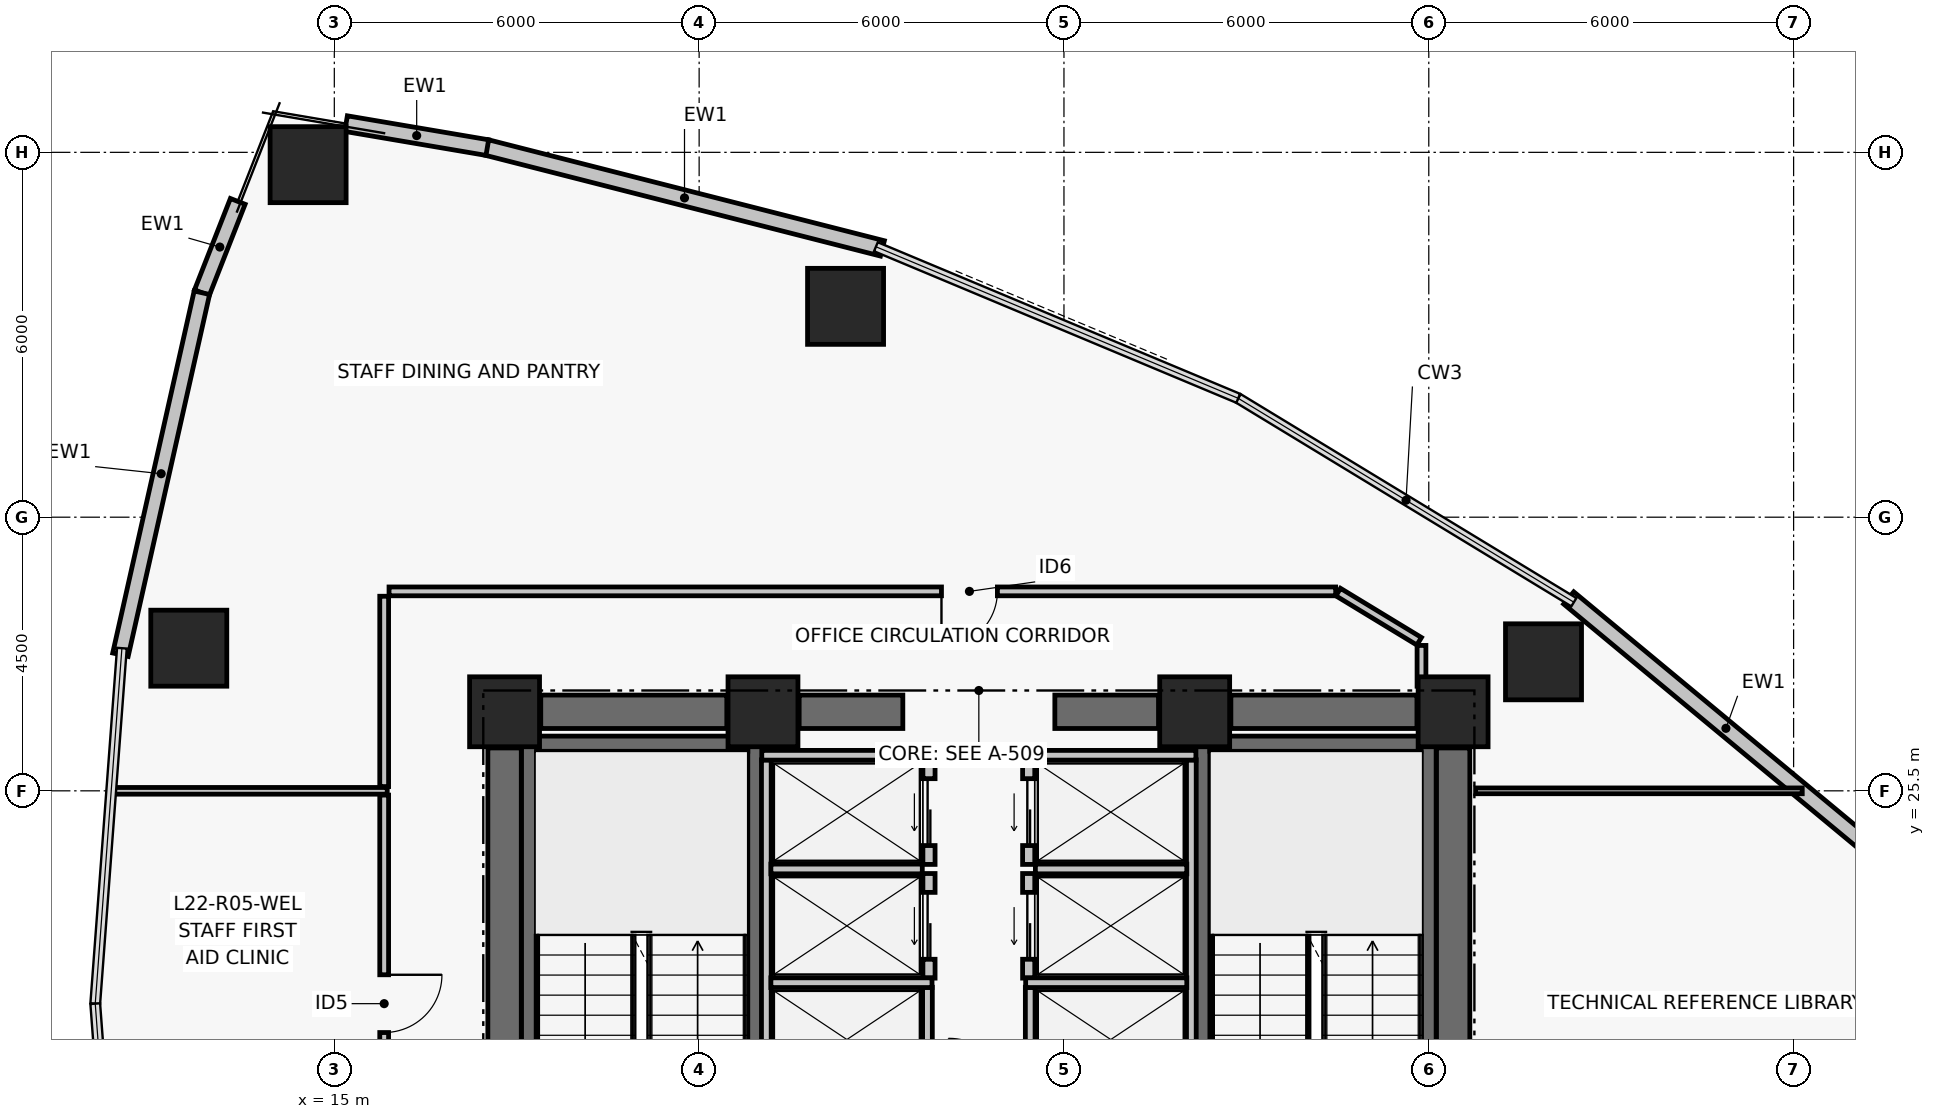
"""IFC4 building model, lengths in metres.
Left out: names, types, materials, properties, quantities, classifications, styles, units other than length and angle.
Written with IfcOpenShell. Run it as: python <this file> out.ifc"""

import sys

from ifc_helpers import new_model, si_unit, direction, frame, frame_2d, origin, origin_2d, place, context, subcontext, project, spatial, rectangle, hollow_rectangle, extrude, element, fill, save


model = new_model("IFC4")
c1 = context("Model", 3, precision=1e-05, world=origin(), true_north=direction((0.0, 1.0)))
c2 = subcontext(c1, "Body", "Model", "MODEL_VIEW")
j1 = project(units=[si_unit("LENGTHUNIT", "METRE"), si_unit("PLANEANGLEUNIT", "RADIAN")], contexts=[c1])
p1 = place(None, origin())
s1 = spatial("IfcSite", under=j1, at=p1, CompositionType="ELEMENT")
p2 = place(p1, origin())
s2 = spatial("IfcBuilding", under=s1, at=p2, CompositionType="ELEMENT")
p3 = place(p2, frame((0.0, 0.0, 92.82)))
s3 = spatial("IfcBuildingStorey", under=s2, at=p3, CompositionType="ELEMENT", Elevation=92.82)
for number, where, z_axis, x_axis in (
    (1, (17.8, 26.8, 0.0), (0.0, 0.0, 1.0), (1.0, 0.0, 0.0)),
    (2, (22.05, 26.8, 0.0), (0.0, 0.0, 1.0), (1.0, 0.0, 0.0)),
    (3, (29.15, 26.8, 0.0), (0.0, 0.0, 1.0), (1.0, 0.0, 0.0)),
    (4, (33.4, 26.8, 0.0), (0.0, 0.0, 1.0), (1.0, 0.0, 0.0)),
):
    element("IfcColumn", number, at=place(p3, frame(where, z_axis=z_axis, x_axis=x_axis)), inside=s3, PredefinedType="COLUMN", context=c2, shape_type="SweptSolid", body=[
        extrude(rectangle(XDim=1.15, YDim=1.15, at=origin_2d()), origin(), (0.0, 0.0, 1.0), 3.72),
    ])
p4 = place(p3, frame((18.395, 26.8, 0.0), z_axis=(0.0, 0.0, 1.0), x_axis=(1.0, 0.0, 0.0)))
e5 = element("IfcWall", 5, at=p4, inside=s3, PredefinedType="SHEAR", context=c2, shape_type="SweptSolid", body=[
    extrude(rectangle(XDim=3.06, YDim=0.55, at=frame_2d((1.53, 0.0))), origin(), (0.0, 0.0, 1.0), 3.47),
])
p5 = place(p3, frame((22.645, 26.8, 0.0), z_axis=(0.0, 0.0, 1.0), x_axis=(1.0, 0.0, 0.0)))
e6 = element("IfcWall", 6, at=p5, inside=s3, PredefinedType="SHEAR", context=c2, shape_type="SweptSolid", body=[
    extrude(rectangle(XDim=1.705, YDim=0.55, at=frame_2d((0.853, 0.0))), origin(), (0.0, 0.0, 1.0), 3.47),
])
p6 = place(p3, frame((26.85, 26.8, 0.0), z_axis=(0.0, 0.0, 1.0), x_axis=(1.0, 0.0, 0.0)))
e7 = element("IfcWall", 7, at=p6, inside=s3, PredefinedType="SHEAR", context=c2, shape_type="SweptSolid", body=[
    extrude(rectangle(XDim=1.705, YDim=0.55, at=frame_2d((0.853, 0.0))), origin(), (0.0, 0.0, 1.0), 3.47),
])
p7 = place(p3, frame((29.745, 26.8, 0.0), z_axis=(0.0, 0.0, 1.0), x_axis=(1.0, 0.0, 0.0)))
e8 = element("IfcWall", 8, at=p7, inside=s3, PredefinedType="SHEAR", context=c2, shape_type="SweptSolid", body=[
    extrude(rectangle(XDim=3.06, YDim=0.55, at=frame_2d((1.53, 0.0))), origin(), (0.0, 0.0, 1.0), 3.47),
])
for number, where, z_axis, x_axis in (
    (9, (17.8, 17.795, 0.0), (0.0, 0.0, 1.0), (0.0, 1.0, 0.0)),
    (10, (33.4, 17.795, 0.0), (0.0, 0.0, 1.0), (0.0, 1.0, 0.0)),
):
    element("IfcWall", number, at=place(p3, frame(where, z_axis=z_axis, x_axis=x_axis)), inside=s3, PredefinedType="SHEAR", context=c2, shape_type="SweptSolid", body=[
        extrude(rectangle(XDim=8.41, YDim=0.55, at=frame_2d((4.205, 0.0))), origin(), (0.0, 0.0, 1.0), 3.47),
    ])
p8 = place(p3, frame((18.204, 17.6, 0.0), z_axis=(0.0, 0.0, 1.0), x_axis=(0.0, 1.0, 0.0)))
e11 = element("IfcWall", 11, at=p8, inside=s3, PredefinedType="SHEAR", context=c2, shape_type="SweptSolid", body=[
    extrude(rectangle(XDim=8.8, YDim=0.25, at=frame_2d((4.4, 0.0))), origin(), (0.0, 0.0, 1.0), 3.47),
])
p9 = place(p3, frame((21.925, 17.6, 0.0), z_axis=(0.0, 0.0, 1.0), x_axis=(0.0, 1.0, 0.0)))
e12 = element("IfcWall", 12, at=p9, inside=s3, PredefinedType="SHEAR", context=c2, shape_type="SweptSolid", body=[
    extrude(rectangle(XDim=8.8, YDim=0.25, at=frame_2d((4.4, 0.0))), origin(), (0.0, 0.0, 1.0), 3.47),
])
p10 = place(p9, frame((0.35, 0.0, 0.0)))
e13 = element("IfcOpeningElement", 13, at=p10, cuts=e12, PredefinedType="OPENING", context=c2, shape_type="SweptSolid", body=[
    extrude(rectangle(XDim=1.05, YDim=2.08, at=frame_2d((0.525, 1.04))), frame((0.0, 0.135, 0.0), z_axis=(0.0, -1.0, 0.0), x_axis=(1.0, 0.0, 0.0)), (0.0, 0.0, 1.0), 0.27),
])
p11 = place(p3, frame((18.329, 26.275, 0.0), z_axis=(0.0, 0.0, 1.0), x_axis=(1.0, 0.0, 0.0)))
e14 = element("IfcWall", 14, at=p11, inside=s3, PredefinedType="SHEAR", context=c2, shape_type="SweptSolid", body=[
    extrude(rectangle(XDim=3.471, YDim=0.25, at=frame_2d((1.735, 0.0))), origin(), (0.0, 0.0, 1.0), 3.47),
])
p12 = place(p3, frame((29.275, 17.6, 0.0), z_axis=(0.0, 0.0, 1.0), x_axis=(0.0, 1.0, 0.0)))
e15 = element("IfcWall", 15, at=p12, inside=s3, PredefinedType="SHEAR", context=c2, shape_type="SweptSolid", body=[
    extrude(rectangle(XDim=8.8, YDim=0.25, at=frame_2d((4.4, 0.0))), origin(), (0.0, 0.0, 1.0), 3.47),
])
p13 = place(p12, frame((0.35, 0.0, 0.0)))
e16 = element("IfcOpeningElement", 16, at=p13, cuts=e15, PredefinedType="OPENING", context=c2, shape_type="SweptSolid", body=[
    extrude(rectangle(XDim=1.05, YDim=2.08, at=frame_2d((0.525, 1.04))), frame((0.0, 0.135, 0.0), z_axis=(0.0, -1.0, 0.0), x_axis=(1.0, 0.0, 0.0)), (0.0, 0.0, 1.0), 0.27),
])
p14 = place(p3, frame((32.996, 17.6, 0.0), z_axis=(0.0, 0.0, 1.0), x_axis=(0.0, 1.0, 0.0)))
e17 = element("IfcWall", 17, at=p14, inside=s3, PredefinedType="SHEAR", context=c2, shape_type="SweptSolid", body=[
    extrude(rectangle(XDim=8.8, YDim=0.25, at=frame_2d((4.4, 0.0))), origin(), (0.0, 0.0, 1.0), 3.47),
])
p15 = place(p3, frame((29.4, 26.275, 0.0), z_axis=(0.0, 0.0, 1.0), x_axis=(1.0, 0.0, 0.0)))
e18 = element("IfcWall", 18, at=p15, inside=s3, PredefinedType="SHEAR", context=c2, shape_type="SweptSolid", body=[
    extrude(rectangle(XDim=3.471, YDim=0.25, at=frame_2d((1.736, 0.0))), origin(), (0.0, 0.0, 1.0), 3.47),
])
for number, where, z_axis, x_axis in (
    (19, (34.887, 27.622, 0.0), (0.0, 0.0, 1.0), (1.0, 0.0, 0.0)),
    (20, (23.408, 33.467, 0.0), (0.0, 0.0, 1.0), (1.0, 0.0, 0.0)),
    (21, (14.569, 35.797, 0.0), (0.0, 0.0, 1.0), (1.0, 0.0, 0.0)),
    (22, (12.607, 27.846, 0.0), (0.0, 0.0, 1.0), (1.0, 0.0, 0.0)),
):
    element("IfcColumn", number, at=place(p3, frame(where, z_axis=z_axis, x_axis=x_axis)), inside=s3, PredefinedType="COLUMN", context=c2, shape_type="SweptSolid", body=[
        extrude(hollow_rectangle(XDim=1.25, YDim=1.25, WallThickness=0.05, at=origin_2d()), origin(), (0.0, 0.0, 1.0), 3.72),
    ])
p16 = place(p3, frame((35.301, 28.672, 0.0), z_axis=(0.0, 0.0, 1.0), x_axis=(0.76975316947, -0.638341646841, 0.0)))
e23 = element("IfcWall", 23, at=p16, inside=s3, PredefinedType="PARTITIONING", context=c2, shape_type="SweptSolid", body=[
    extrude(rectangle(XDim=6.718, YDim=0.26, at=frame_2d((3.359, 0.0))), origin(), (0.0, 0.0, 1.0), 3.47),
])
p17 = place(p3, frame((17.505, 36.081, 0.0), z_axis=(0.0, 0.0, 1.0), x_axis=(0.968981437296, -0.247133514876, 0.0)))
e24 = element("IfcWall", 24, at=p17, inside=s3, PredefinedType="PARTITIONING", context=c2, shape_type="SweptSolid", body=[
    extrude(rectangle(XDim=6.718, YDim=0.26, at=frame_2d((3.359, 0.0))), origin(), (0.0, 0.0, 1.0), 3.47),
])
p18 = place(p3, frame((15.193, 36.472, 0.0), z_axis=(0.0, 0.0, 1.0), x_axis=(0.985905269947, -0.167304508875, 0.0)))
e25 = element("IfcWall", 25, at=p18, inside=s3, PredefinedType="PARTITIONING", context=c2, shape_type="SweptSolid", body=[
    extrude(rectangle(XDim=2.357, YDim=0.26, at=frame_2d((1.178, 0.0))), origin(), (0.0, 0.0, 1.0), 3.47),
])
p19 = place(p3, frame((12.822, 33.691, 0.0), z_axis=(0.0, 0.0, 1.0), x_axis=(0.365488551504, 0.930815835018, 0.0)))
e26 = element("IfcWall", 26, at=p19, inside=s3, PredefinedType="PARTITIONING", context=c2, shape_type="SweptSolid", body=[
    extrude(rectangle(XDim=1.614, YDim=0.26, at=frame_2d((0.807, 0.0))), origin(), (0.0, 0.0, 1.0), 3.47),
])
p20 = place(p3, frame((11.482, 27.738, 0.0), z_axis=(0.0, 0.0, 1.0), x_axis=(0.219535044336, 0.975604614743, 0.0)))
e27 = element("IfcWall", 27, at=p20, inside=s3, PredefinedType="PARTITIONING", context=c2, shape_type="SweptSolid", body=[
    extrude(rectangle(XDim=6.102, YDim=0.26, at=frame_2d((3.051, 0.0))), origin(), (0.0, 0.0, 1.0), 3.47),
])
p21 = place(p3, frame((24.78, 22.42, 0.0), z_axis=(0.0, 0.0, 1.0), x_axis=(0.0, 1.0, 0.0)))
e28 = element("IfcWall", 28, at=p21, inside=s3, PredefinedType="PARTITIONING", context=c2, shape_type="SweptSolid", body=[
    extrude(rectangle(XDim=1.72, YDim=0.2, at=frame_2d((0.86, 0.0))), origin(), (0.0, 0.0, 1.0), 3.47),
])
p22 = place(p21, frame((0.31, 0.0, 0.0)))
e29 = element("IfcOpeningElement", 29, at=p22, cuts=e28, PredefinedType="OPENING", context=c2, shape_type="SweptSolid", body=[
    extrude(rectangle(XDim=1.1, YDim=2.08, at=frame_2d((0.55, 1.04))), frame((0.0, 0.11, 0.0), z_axis=(0.0, -1.0, 0.0), x_axis=(1.0, 0.0, 0.0)), (0.0, 0.0, 1.0), 0.22),
])
p23 = place(p3, frame((24.78, 24.29, 0.0), z_axis=(0.0, 0.0, 1.0), x_axis=(0.0, 1.0, 0.0)))
e30 = element("IfcWall", 30, at=p23, inside=s3, PredefinedType="PARTITIONING", context=c2, shape_type="SweptSolid", body=[
    extrude(rectangle(XDim=1.72, YDim=0.2, at=frame_2d((0.86, 0.0))), origin(), (0.0, 0.0, 1.0), 3.47),
])
p24 = place(p23, frame((0.31, 0.0, 0.0)))
e31 = element("IfcOpeningElement", 31, at=p24, cuts=e30, PredefinedType="OPENING", context=c2, shape_type="SweptSolid", body=[
    extrude(rectangle(XDim=1.1, YDim=2.08, at=frame_2d((0.55, 1.04))), frame((0.0, 0.11, 0.0), z_axis=(0.0, -1.0, 0.0), x_axis=(1.0, 0.0, 0.0)), (0.0, 0.0, 1.0), 0.22),
])
p25 = place(p3, frame((26.42, 22.42, 0.0), z_axis=(0.0, 0.0, 1.0), x_axis=(0.0, 1.0, 0.0)))
e32 = element("IfcWall", 32, at=p25, inside=s3, PredefinedType="PARTITIONING", context=c2, shape_type="SweptSolid", body=[
    extrude(rectangle(XDim=1.72, YDim=0.2, at=frame_2d((0.86, 0.0))), origin(), (0.0, 0.0, 1.0), 3.47),
])
p26 = place(p25, frame((0.31, 0.0, 0.0)))
e33 = element("IfcOpeningElement", 33, at=p26, cuts=e32, PredefinedType="OPENING", context=c2, shape_type="SweptSolid", body=[
    extrude(rectangle(XDim=1.1, YDim=2.08, at=frame_2d((0.55, 1.04))), frame((0.0, 0.11, 0.0), z_axis=(0.0, -1.0, 0.0), x_axis=(1.0, 0.0, 0.0)), (0.0, 0.0, 1.0), 0.22),
])
p27 = place(p3, frame((26.42, 24.29, 0.0), z_axis=(0.0, 0.0, 1.0), x_axis=(0.0, 1.0, 0.0)))
e34 = element("IfcWall", 34, at=p27, inside=s3, PredefinedType="PARTITIONING", context=c2, shape_type="SweptSolid", body=[
    extrude(rectangle(XDim=1.72, YDim=0.2, at=frame_2d((0.86, 0.0))), origin(), (0.0, 0.0, 1.0), 3.47),
])
p28 = place(p27, frame((0.31, 0.0, 0.0)))
e35 = element("IfcOpeningElement", 35, at=p28, cuts=e34, PredefinedType="OPENING", context=c2, shape_type="SweptSolid", body=[
    extrude(rectangle(XDim=1.1, YDim=2.08, at=frame_2d((0.55, 1.04))), frame((0.0, 0.11, 0.0), z_axis=(0.0, -1.0, 0.0), x_axis=(1.0, 0.0, 0.0)), (0.0, 0.0, 1.0), 0.22),
])
p29 = place(p3, frame((22.105, 20.56, 0.0), z_axis=(0.0, 0.0, 1.0), x_axis=(0.0, 1.0, 0.0)))
e36 = element("IfcWall", 36, at=p29, inside=s3, PredefinedType="PARTITIONING", context=c2, shape_type="SweptSolid", body=[
    extrude(rectangle(XDim=5.45, YDim=0.16, at=frame_2d((2.725, 0.0))), origin(), (0.0, 0.0, 1.0), 3.47),
])
p30 = place(p3, frame((24.755, 20.56, 0.0), z_axis=(0.0, 0.0, 1.0), x_axis=(0.0, 1.0, 0.0)))
e37 = element("IfcWall", 37, at=p30, inside=s3, PredefinedType="PARTITIONING", context=c2, shape_type="SweptSolid", body=[
    extrude(rectangle(XDim=1.71, YDim=0.16, at=frame_2d((0.855, 0.0))), origin(), (0.0, 0.0, 1.0), 3.47),
])
p31 = place(p3, frame((22.18, 22.345, 0.0), z_axis=(0.0, 0.0, 1.0), x_axis=(1.0, 0.0, 0.0)))
e38 = element("IfcWall", 38, at=p31, inside=s3, PredefinedType="PARTITIONING", context=c2, shape_type="SweptSolid", body=[
    extrude(rectangle(XDim=2.65, YDim=0.16, at=frame_2d((1.325, 0.0))), origin(), (0.0, 0.0, 1.0), 3.47),
])
p32 = place(p3, frame((22.18, 24.215, 0.0), z_axis=(0.0, 0.0, 1.0), x_axis=(1.0, 0.0, 0.0)))
e39 = element("IfcWall", 39, at=p32, inside=s3, PredefinedType="PARTITIONING", context=c2, shape_type="SweptSolid", body=[
    extrude(rectangle(XDim=2.49, YDim=0.16, at=frame_2d((1.245, 0.0))), origin(), (0.0, 0.0, 1.0), 3.47),
])
p33 = place(p3, frame((22.03, 26.085, 0.0), z_axis=(0.0, 0.0, 1.0), x_axis=(1.0, 0.0, 0.0)))
e40 = element("IfcWall", 40, at=p33, inside=s3, PredefinedType="PARTITIONING", context=c2, shape_type="SweptSolid", body=[
    extrude(rectangle(XDim=2.83, YDim=0.16, at=frame_2d((1.415, 0.0))), origin(), (0.0, 0.0, 1.0), 3.47),
])
p34 = place(p3, frame((29.095, 20.56, 0.0), z_axis=(0.0, 0.0, 1.0), x_axis=(0.0, 1.0, 0.0)))
e41 = element("IfcWall", 41, at=p34, inside=s3, PredefinedType="PARTITIONING", context=c2, shape_type="SweptSolid", body=[
    extrude(rectangle(XDim=5.45, YDim=0.16, at=frame_2d((2.725, 0.0))), origin(), (0.0, 0.0, 1.0), 3.47),
])
p35 = place(p3, frame((26.445, 20.56, 0.0), z_axis=(0.0, 0.0, 1.0), x_axis=(0.0, 1.0, 0.0)))
e42 = element("IfcWall", 42, at=p35, inside=s3, PredefinedType="PARTITIONING", context=c2, shape_type="SweptSolid", body=[
    extrude(rectangle(XDim=1.71, YDim=0.16, at=frame_2d((0.855, 0.0))), origin(), (0.0, 0.0, 1.0), 3.47),
])
p36 = place(p3, frame((26.37, 22.345, 0.0), z_axis=(0.0, 0.0, 1.0), x_axis=(1.0, 0.0, 0.0)))
e43 = element("IfcWall", 43, at=p36, inside=s3, PredefinedType="PARTITIONING", context=c2, shape_type="SweptSolid", body=[
    extrude(rectangle(XDim=2.65, YDim=0.16, at=frame_2d((1.325, 0.0))), origin(), (0.0, 0.0, 1.0), 3.47),
])
p37 = place(p3, frame((26.53, 24.215, 0.0), z_axis=(0.0, 0.0, 1.0), x_axis=(1.0, 0.0, 0.0)))
e44 = element("IfcWall", 44, at=p37, inside=s3, PredefinedType="PARTITIONING", context=c2, shape_type="SweptSolid", body=[
    extrude(rectangle(XDim=2.49, YDim=0.16, at=frame_2d((1.245, 0.0))), origin(), (0.0, 0.0, 1.0), 3.47),
])
p38 = place(p3, frame((26.34, 26.085, 0.0), z_axis=(0.0, 0.0, 1.0), x_axis=(1.0, 0.0, 0.0)))
e45 = element("IfcWall", 45, at=p38, inside=s3, PredefinedType="PARTITIONING", context=c2, shape_type="SweptSolid", body=[
    extrude(rectangle(XDim=2.83, YDim=0.16, at=frame_2d((1.415, 0.0))), origin(), (0.0, 0.0, 1.0), 3.47),
])
p39 = place(p3, frame((33.74, 27.22, 0.0), z_axis=(0.0, 0.0, 1.0), x_axis=(-1.0, 0.0, 0.0)))
e46 = element("IfcWall", 46, at=p39, inside=s3, PredefinedType="PARTITIONING", context=c2, shape_type="SweptSolid", body=[
    extrude(rectangle(XDim=0.86, YDim=0.145, at=frame_2d((0.43, 0.0))), origin(), (0.0, 0.0, 1.0), 2.6),
])
p40 = place(p3, frame((32.88, 27.22, 0.0), z_axis=(0.0, 0.0, 1.0), x_axis=(0.0, 1.0, 0.0)))
e47 = element("IfcWall", 47, at=p40, inside=s3, PredefinedType="PARTITIONING", context=c2, shape_type="SweptSolid", body=[
    extrude(rectangle(XDim=0.671, YDim=0.145, at=frame_2d((0.335, 0.0))), origin(), (0.0, 0.0, 1.0), 2.6),
])
p41 = place(p3, frame((32.842, 27.96, 0.0), z_axis=(0.0, 0.0, 1.0), x_axis=(-0.854742818792, 0.519051744745, 0.0)))
e48 = element("IfcWall", 48, at=p41, inside=s3, PredefinedType="PARTITIONING", context=c2, shape_type="SweptSolid", body=[
    extrude(rectangle(XDim=1.558, YDim=0.145, at=frame_2d((0.779, 0.0))), origin(), (0.0, 0.0, 1.0), 3.05),
])
p42 = place(p3, frame((31.469, 28.78, 0.0), z_axis=(0.0, 0.0, 1.0), x_axis=(-1.0, 0.0, 0.0)))
e49 = element("IfcWall", 49, at=p42, inside=s3, PredefinedType="PARTITIONING", context=c2, shape_type="SweptSolid", body=[
    extrude(rectangle(XDim=15.569, YDim=0.145, at=frame_2d((7.784, 0.0))), origin(), (0.0, 0.0, 1.0), 2.65),
])
p43 = place(p42, frame((5.563, 0.0, 0.0)))
e50 = element("IfcOpeningElement", 50, at=p43, cuts=e49, PredefinedType="OPENING", context=c2, shape_type="SweptSolid", body=[
    extrude(rectangle(XDim=0.92, YDim=2.05, at=frame_2d((0.46, 1.025))), frame((0.0, 0.083, 0.0), z_axis=(0.0, -1.0, 0.0), x_axis=(1.0, 0.0, 0.0)), (0.0, 0.0, 1.0), 0.165),
])
p44 = place(p3, frame((15.82, 28.7, 0.0), z_axis=(0.0, 0.0, 1.0), x_axis=(0.0, -1.0, 0.0)))
e51 = element("IfcWall", 51, at=p44, inside=s3, PredefinedType="PARTITIONING", context=c2, shape_type="SweptSolid", body=[
    extrude(rectangle(XDim=3.13, YDim=0.145, at=frame_2d((1.565, 0.0))), origin(), (0.0, 0.0, 1.0), 2.65),
])
p45 = place(p3, frame((15.82, 25.43, 0.0), z_axis=(0.0, 0.0, 1.0), x_axis=(0.0, -1.0, 0.0)))
e52 = element("IfcWall", 52, at=p45, inside=s3, PredefinedType="PARTITIONING", context=c2, shape_type="SweptSolid", body=[
    extrude(rectangle(XDim=6.86, YDim=0.145, at=frame_2d((3.43, 0.0))), origin(), (0.0, 0.0, 1.0), 3.05),
])
p46 = place(p45, frame((2.955, 0.0, 0.0)))
e53 = element("IfcOpeningElement", 53, at=p46, cuts=e52, PredefinedType="OPENING", context=c2, shape_type="SweptSolid", body=[
    extrude(rectangle(XDim=0.95, YDim=2.06, at=frame_2d((0.475, 1.03))), frame((0.0, 0.083, 0.0), z_axis=(0.0, -1.0, 0.0), x_axis=(1.0, 0.0, 0.0)), (0.0, 0.0, 1.0), 0.165),
])
p47 = place(p3, frame((11.321, 25.5, 0.0), z_axis=(0.0, 0.0, 1.0), x_axis=(1.0, 0.0, 0.0)))
e54 = element("IfcWall", 54, at=p47, inside=s3, PredefinedType="PARTITIONING", context=c2, shape_type="SweptSolid", body=[
    extrude(rectangle(XDim=4.549, YDim=0.11, at=frame_2d((2.275, 0.0))), origin(), (0.0, 0.0, 1.0), 2.85),
])
p48 = place(p3, frame((33.77, 25.5, 0.0), z_axis=(0.0, 0.0, 1.0), x_axis=(1.0, 0.0, 0.0)))
e55 = element("IfcWall", 55, at=p48, inside=s3, PredefinedType="PARTITIONING", context=c2, shape_type="SweptSolid", body=[
    extrude(rectangle(XDim=5.372, YDim=0.095, at=frame_2d((2.686, 0.0))), origin(), (0.0, 0.0, 1.0), 2.6),
])
p49 = place(p22, origin())
e56 = element("IfcDoor", 56, at=p49, inside=s3, OperationType="DOUBLE_DOOR_SLIDING", PredefinedType="DOOR", context=c2, shape_type="SweptSolid", body=[
    extrude(rectangle(XDim=1.1, YDim=2.08, at=frame_2d((0.55, 1.04))), frame((0.0, 0.025, 0.0), z_axis=(0.0, -1.0, 0.0), x_axis=(1.0, 0.0, 0.0)), (0.0, 0.0, 1.0), 0.05),
])
fill(e29, e56)
p50 = place(p24, origin())
e57 = element("IfcDoor", 57, at=p50, inside=s3, OperationType="DOUBLE_DOOR_SLIDING", PredefinedType="DOOR", context=c2, shape_type="SweptSolid", body=[
    extrude(rectangle(XDim=1.1, YDim=2.08, at=frame_2d((0.55, 1.04))), frame((0.0, 0.025, 0.0), z_axis=(0.0, -1.0, 0.0), x_axis=(1.0, 0.0, 0.0)), (0.0, 0.0, 1.0), 0.05),
])
fill(e31, e57)
p51 = place(p26, origin())
e58 = element("IfcDoor", 58, at=p51, inside=s3, OperationType="DOUBLE_DOOR_SLIDING", PredefinedType="DOOR", context=c2, shape_type="SweptSolid", body=[
    extrude(rectangle(XDim=1.1, YDim=2.08, at=frame_2d((0.55, 1.04))), frame((0.0, 0.025, 0.0), z_axis=(0.0, -1.0, 0.0), x_axis=(1.0, 0.0, 0.0)), (0.0, 0.0, 1.0), 0.05),
])
fill(e33, e58)
p52 = place(p28, origin())
e59 = element("IfcDoor", 59, at=p52, inside=s3, OperationType="DOUBLE_DOOR_SLIDING", PredefinedType="DOOR", context=c2, shape_type="SweptSolid", body=[
    extrude(rectangle(XDim=1.1, YDim=2.08, at=frame_2d((0.55, 1.04))), frame((0.0, 0.025, 0.0), z_axis=(0.0, -1.0, 0.0), x_axis=(1.0, 0.0, 0.0)), (0.0, 0.0, 1.0), 0.05),
])
fill(e35, e59)
p53 = place(p43, origin())
e60 = element("IfcDoor", 60, at=p53, inside=s3, OperationType="SINGLE_SWING_RIGHT", PredefinedType="DOOR", context=c2, shape_type="SweptSolid", body=[
    extrude(rectangle(XDim=0.92, YDim=2.05, at=frame_2d((0.46, 1.025))), frame((0.0, 0.025, 0.0), z_axis=(0.0, -1.0, 0.0), x_axis=(1.0, 0.0, 0.0)), (0.0, 0.0, 1.0), 0.05),
])
fill(e50, e60)
p54 = place(p46, origin())
e61 = element("IfcDoor", 61, at=p54, inside=s3, OperationType="SINGLE_SWING_LEFT", PredefinedType="DOOR", context=c2, shape_type="SweptSolid", body=[
    extrude(rectangle(XDim=0.95, YDim=2.06, at=frame_2d((0.475, 1.03))), frame((0.0, 0.025, 0.0), z_axis=(0.0, -1.0, 0.0), x_axis=(1.0, 0.0, 0.0)), (0.0, 0.0, 1.0), 0.05),
])
fill(e53, e61)
save(model, sys.argv[1])
